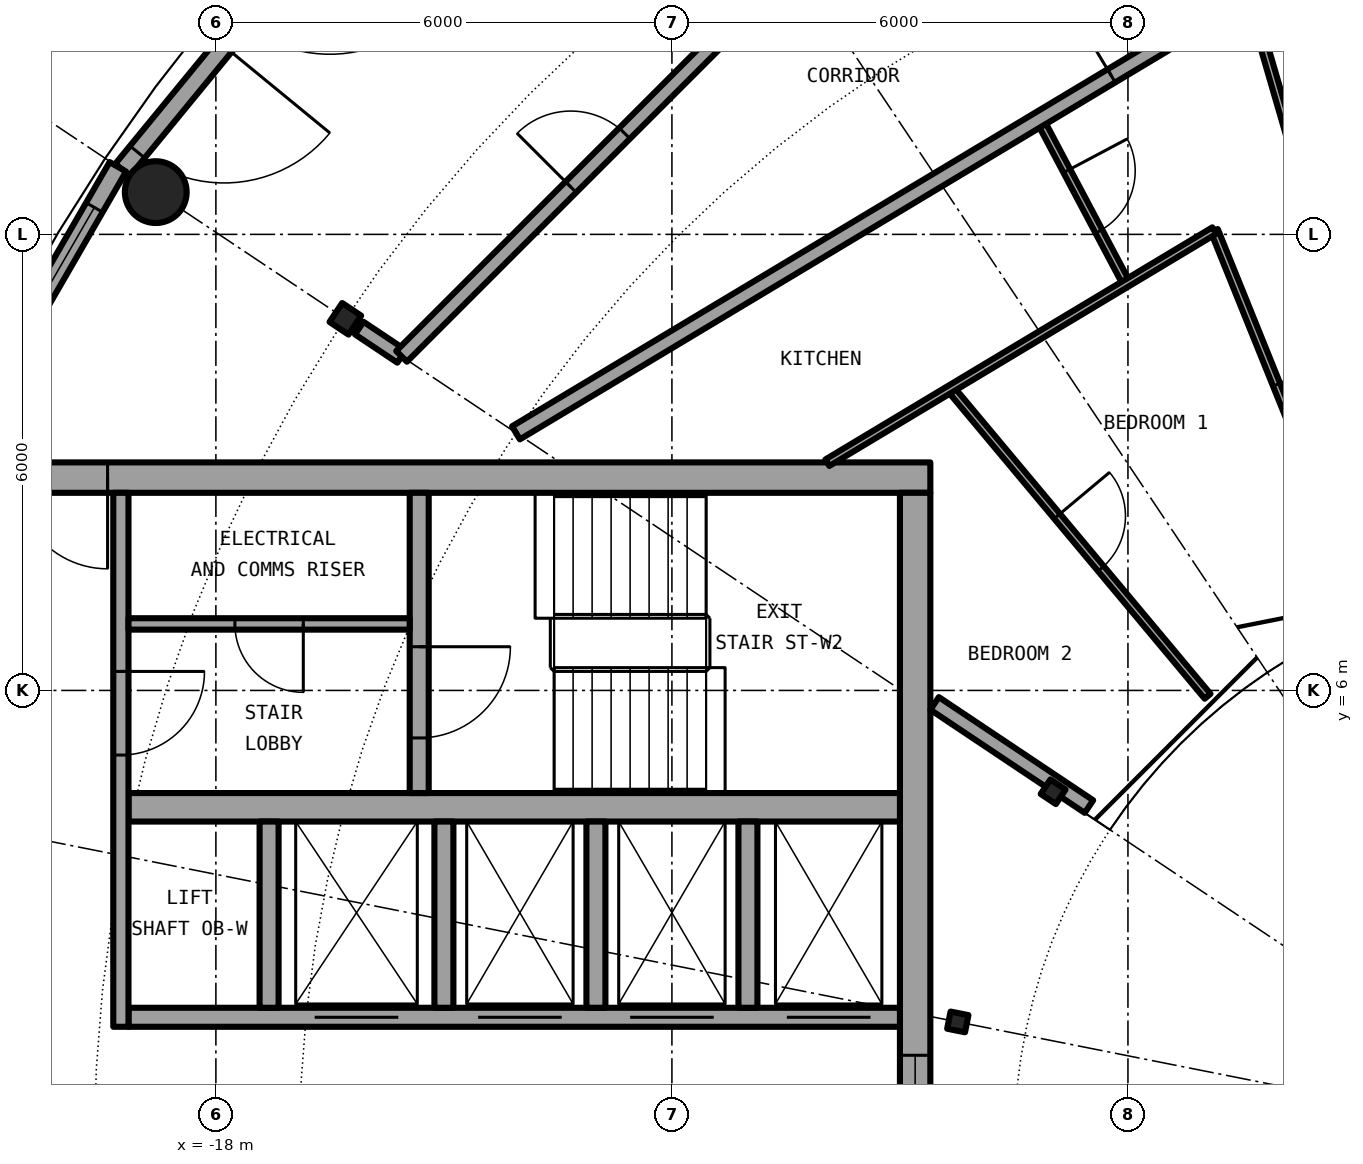
"""IFC4 building model, lengths in metres.
Left out: names, types, materials, properties, quantities, classifications, styles, units other than length and angle.
Written with IfcOpenShell. Run it as: python <this file> out.ifc"""

import sys

from ifc_helpers import new_model, si_unit, direction, frame, frame_2d, origin, origin_2d, place, context, subcontext, project, spatial, rectangle, hollow_circle, i_section, extrude, element, fill, save


model = new_model("IFC4")
c1 = context("Model", 3, precision=1e-05, world=origin(), true_north=direction((0.0, 1.0)))
c2 = subcontext(c1, "Body", "Model", "MODEL_VIEW")
j1 = project(units=[si_unit("LENGTHUNIT", "METRE"), si_unit("PLANEANGLEUNIT", "RADIAN")], contexts=[c1])
p1 = place(None, origin())
s1 = spatial("IfcSite", under=j1, at=p1, CompositionType="ELEMENT")
p2 = place(p1, origin())
s2 = spatial("IfcBuilding", under=s1, at=p2, CompositionType="ELEMENT")
p3 = place(p2, frame((0.0, 0.0, 249.3)))
s3 = spatial("IfcBuildingStorey", under=s2, at=p3, CompositionType="ELEMENT", Elevation=249.3)
p4 = place(p3, frame((-18.791, 12.556, 0.0), z_axis=(0.0, 0.0, 1.0), x_axis=(1.0, 0.0, 0.0)))
e1 = element("IfcColumn", 1, at=p4, inside=s3, PredefinedType="COLUMN", context=c2, shape_type="SweptSolid", body=[
    extrude(hollow_circle(Radius=0.406, WallThickness=0.03, at=origin_2d()), origin(), (0.0, 0.0, 1.0), 3.05),
])
p5 = place(p3, frame((-16.297, 10.889, 0.0), z_axis=(0.0, 0.0, 1.0), x_axis=(-0.831469612303, 0.55557023302, 0.0)))
e2 = element("IfcColumn", 2, at=p5, inside=s3, PredefinedType="COLUMN", context=c2, shape_type="SweptSolid", body=[
    extrude(i_section(OverallWidth=0.3, OverallDepth=0.3, WebThickness=0.011, FlangeThickness=0.019, FilletRadius=0.027, at=origin_2d()), origin(), (0.0, 0.0, 1.0), 3.05),
])
for number, where, z_axis, x_axis in (
    (3, (-6.984, 4.667, 0.0), (0.0, 0.0, 1.0), (-0.831, 0.556, 0.0)),
    (4, (-8.239, 1.639, 0.0), (0.0, 0.0, 1.0), (-0.981, 0.195, 0.0)),
):
    element("IfcColumn", number, at=place(p3, frame(where, z_axis=z_axis, x_axis=x_axis)), inside=s3, PredefinedType="COLUMN", context=c2, shape_type="SweptSolid", body=[
        extrude(i_section(OverallWidth=0.24, OverallDepth=0.23, WebThickness=0.008, FlangeThickness=0.012, FilletRadius=0.021, at=origin_2d()), origin(), (0.0, 0.0, 1.0), 3.05),
    ])
p6 = place(p3, frame((-16.352, 16.352, 0.0), z_axis=(0.0, 0.0, 1.0), x_axis=(-0.634418942337, -0.772989395532, 0.0)))
e5 = element("IfcWall", 5, at=p6, inside=s3, PredefinedType="SOLIDWALL", context=c2, shape_type="SweptSolid", body=[
    extrude(rectangle(XDim=4.533, YDim=0.25, at=frame_2d((2.267, 0.0))), origin(), (0.0, 0.0, 1.0), 2.7),
])
p7 = place(p6, frame((0.236, 0.0, 0.0)))
e6 = element("IfcOpeningElement", 6, at=p7, cuts=e5, PredefinedType="OPENING", context=c2, shape_type="SweptSolid", body=[
    extrude(rectangle(XDim=1.8, YDim=2.2, at=frame_2d((0.9, 1.1))), frame((0.0, 0.135, 0.0), z_axis=(0.0, -1.0, 0.0), x_axis=(1.0, 0.0, 0.0)), (0.0, 0.0, 1.0), 0.27),
])
p8 = place(p6, frame((2.427, 0.0, 0.0)))
e7 = element("IfcOpeningElement", 7, at=p8, cuts=e5, PredefinedType="OPENING", context=c2, shape_type="SweptSolid", body=[
    extrude(rectangle(XDim=1.8, YDim=2.2, at=frame_2d((0.9, 1.1))), frame((0.0, 0.135, 0.0), z_axis=(0.0, -1.0, 0.0), x_axis=(1.0, 0.0, 0.0)), (0.0, 0.0, 1.0), 0.27),
])
p9 = place(p3, frame((-19.29, 12.889, 0.0), z_axis=(0.0, 0.0, 1.0), x_axis=(-0.499903546559, -0.866081084043, 0.0)))
e8 = element("IfcWall", 8, at=p9, inside=s3, PredefinedType="SOLIDWALL", context=c2, shape_type="SweptSolid", body=[
    extrude(rectangle(XDim=3.034, YDim=0.25, at=frame_2d((1.517, 0.0))), origin(), (0.0, 0.0, 1.0), 2.7),
])
p10 = place(p9, frame((0.617, 0.0, 0.3)))
e9 = element("IfcOpeningElement", 9, at=p10, cuts=e8, PredefinedType="OPENING", context=c2, shape_type="SweptSolid", body=[
    extrude(rectangle(XDim=1.8, YDim=2.1, at=frame_2d((0.9, 1.05))), frame((0.0, 0.135, 0.0), z_axis=(0.0, -1.0, 0.0), x_axis=(1.0, 0.0, 0.0)), (0.0, 0.0, 1.0), 0.27),
])
p11 = place(p3, frame((-8.6, 8.8, 0.0), z_axis=(0.0, 0.0, 1.0), x_axis=(-1.0, 0.0, 0.0)))
e10 = element("IfcWall", 10, at=p11, inside=s3, PredefinedType="SHEAR", context=c2, shape_type="SweptSolid", body=[
    extrude(rectangle(XDim=12.5, YDim=0.4, at=frame_2d((6.25, 0.0))), origin(), (0.0, 0.0, 1.0), 3.05),
])
p12 = place(p11, frame((10.825, 0.0, 0.0)))
e11 = element("IfcOpeningElement", 11, at=p12, cuts=e10, PredefinedType="OPENING", context=c2, shape_type="SweptSolid", body=[
    extrude(rectangle(XDim=1.2, YDim=2.3, at=frame_2d((0.6, 1.15))), frame((0.0, 0.21, 0.0), z_axis=(0.0, -1.0, 0.0), x_axis=(1.0, 0.0, 0.0)), (0.0, 0.0, 1.0), 0.42),
])
p13 = place(p3, frame((-8.8, 8.6, 0.0), z_axis=(0.0, 0.0, 1.0), x_axis=(0.0, -1.0, 0.0)))
e12 = element("IfcWall", 12, at=p13, inside=s3, PredefinedType="SHEAR", context=c2, shape_type="SweptSolid", body=[
    extrude(rectangle(XDim=17.2, YDim=0.4, at=frame_2d((8.6, 0.0))), origin(), (0.0, 0.0, 1.0), 3.05),
])
p14 = place(p13, frame((7.4, 0.0, 0.1)))
e13 = element("IfcOpeningElement", 13, at=p14, cuts=e12, PredefinedType="OPENING", context=c2, shape_type="SweptSolid", body=[
    extrude(rectangle(XDim=2.4, YDim=2.2, at=frame_2d((1.2, 1.1))), frame((0.0, 0.21, 0.0), z_axis=(0.0, -1.0, 0.0), x_axis=(1.0, 0.0, 0.0)), (0.0, 0.0, 1.0), 0.42),
])
p15 = place(p3, frame((-9.0, 1.7, 0.0), z_axis=(0.0, 0.0, 1.0), x_axis=(-1.0, 0.0, 0.0)))
e14 = element("IfcWall", 14, at=p15, inside=s3, PredefinedType="SHEAR", context=c2, shape_type="SweptSolid", body=[
    extrude(rectangle(XDim=10.15, YDim=0.25, at=frame_2d((5.075, 0.0))), origin(), (0.0, 0.0, 1.0), 3.05),
])
p16 = place(p15, frame((0.387, 0.0, 0.0)))
e15 = element("IfcOpeningElement", 15, at=p16, cuts=e14, PredefinedType="OPENING", context=c2, shape_type="SweptSolid", body=[
    extrude(rectangle(XDim=1.1, YDim=2.3, at=frame_2d((0.55, 1.15))), frame((0.0, 0.135, 0.0), z_axis=(0.0, -1.0, 0.0), x_axis=(1.0, 0.0, 0.0)), (0.0, 0.0, 1.0), 0.27),
])
p17 = place(p15, frame((2.45, 0.0, 0.0)))
e16 = element("IfcOpeningElement", 16, at=p17, cuts=e14, PredefinedType="OPENING", context=c2, shape_type="SweptSolid", body=[
    extrude(rectangle(XDim=1.1, YDim=2.3, at=frame_2d((0.55, 1.15))), frame((0.0, 0.135, 0.0), z_axis=(0.0, -1.0, 0.0), x_axis=(1.0, 0.0, 0.0)), (0.0, 0.0, 1.0), 0.27),
])
p18 = place(p15, frame((4.45, 0.0, 0.0)))
e17 = element("IfcOpeningElement", 17, at=p18, cuts=e14, PredefinedType="OPENING", context=c2, shape_type="SweptSolid", body=[
    extrude(rectangle(XDim=1.1, YDim=2.3, at=frame_2d((0.55, 1.15))), frame((0.0, 0.135, 0.0), z_axis=(0.0, -1.0, 0.0), x_axis=(1.0, 0.0, 0.0)), (0.0, 0.0, 1.0), 0.27),
])
p19 = place(p15, frame((6.6, 0.0, 0.0)))
e18 = element("IfcOpeningElement", 18, at=p19, cuts=e14, PredefinedType="OPENING", context=c2, shape_type="SweptSolid", body=[
    extrude(rectangle(XDim=1.1, YDim=2.3, at=frame_2d((0.55, 1.15))), frame((0.0, 0.135, 0.0), z_axis=(0.0, -1.0, 0.0), x_axis=(1.0, 0.0, 0.0)), (0.0, 0.0, 1.0), 0.27),
])
p20 = place(p3, frame((-9.0, 4.462, 0.0), z_axis=(0.0, 0.0, 1.0), x_axis=(-1.0, 0.0, 0.0)))
e19 = element("IfcWall", 19, at=p20, inside=s3, PredefinedType="SHEAR", context=c2, shape_type="SweptSolid", body=[
    extrude(rectangle(XDim=10.15, YDim=0.375, at=frame_2d((5.075, 0.0))), origin(), (0.0, 0.0, 1.0), 3.05),
])
p21 = place(p3, frame((-15.325, 8.6, 0.0), z_axis=(0.0, 0.0, 1.0), x_axis=(0.0, -1.0, 0.0)))
e20 = element("IfcWall", 20, at=p21, inside=s3, PredefinedType="SHEAR", context=c2, shape_type="SweptSolid", body=[
    extrude(rectangle(XDim=3.95, YDim=0.25, at=frame_2d((1.975, 0.0))), origin(), (0.0, 0.0, 1.0), 3.05),
])
p22 = place(p21, frame((2.025, 0.0, 0.0)))
e21 = element("IfcOpeningElement", 21, at=p22, cuts=e20, PredefinedType="OPENING", context=c2, shape_type="SweptSolid", body=[
    extrude(rectangle(XDim=1.2, YDim=2.3, at=frame_2d((0.6, 1.15))), frame((0.0, 0.135, 0.0), z_axis=(0.0, -1.0, 0.0), x_axis=(1.0, 0.0, 0.0)), (0.0, 0.0, 1.0), 0.27),
])
for number, where, z_axis, x_axis in (
    (22, (-15.0, 1.825, 0.0), (0.0, 0.0, 1.0), (0.0, 1.0, 0.0)),
    (23, (-17.3, 1.825, 0.0), (0.0, 0.0, 1.0), (0.0, 1.0, 0.0)),
):
    element("IfcWall", number, at=place(p3, frame(where, z_axis=z_axis, x_axis=x_axis)), inside=s3, PredefinedType="SOLIDWALL", context=c2, shape_type="SweptSolid", body=[
        extrude(rectangle(XDim=2.45, YDim=0.25, at=frame_2d((1.225, 0.0))), origin(), (0.0, 0.0, 1.0), 2.7),
    ])
p23 = place(p3, frame((-19.25, 8.6, 0.0), z_axis=(0.0, 0.0, 1.0), x_axis=(0.0, -1.0, 0.0)))
e24 = element("IfcWall", 24, at=p23, inside=s3, PredefinedType="SOLIDWALL", context=c2, shape_type="SweptSolid", body=[
    extrude(rectangle(XDim=7.025, YDim=0.2, at=frame_2d((3.513, 0.0))), origin(), (0.0, 0.0, 1.0), 2.7),
])
p24 = place(p23, frame((2.35, 0.0, 0.0)))
e25 = element("IfcOpeningElement", 25, at=p24, cuts=e24, PredefinedType="OPENING", context=c2, shape_type="SweptSolid", body=[
    extrude(rectangle(XDim=1.1, YDim=2.3, at=frame_2d((0.55, 1.15))), frame((0.0, 0.11, 0.0), z_axis=(0.0, -1.0, 0.0), x_axis=(1.0, 0.0, 0.0)), (0.0, 0.0, 1.0), 0.22),
])
for number, where, z_axis, x_axis in (
    (26, (-11.0, 1.825, 0.0), (0.0, 0.0, 1.0), (0.0, 1.0, 0.0)),
    (27, (-13.0, 1.825, 0.0), (0.0, 0.0, 1.0), (0.0, 1.0, 0.0)),
):
    element("IfcWall", number, at=place(p3, frame(where, z_axis=z_axis, x_axis=x_axis)), inside=s3, PredefinedType="SOLIDWALL", context=c2, shape_type="SweptSolid", body=[
        extrude(rectangle(XDim=2.45, YDim=0.25, at=frame_2d((1.225, 0.0))), origin(), (0.0, 0.0, 1.0), 2.7),
    ])
p25 = place(p3, frame((-15.45, 6.875, 0.0), z_axis=(0.0, 0.0, 1.0), x_axis=(-1.0, 0.0, 0.0)))
e28 = element("IfcWall", 28, at=p25, inside=s3, PredefinedType="PARTITIONING", context=c2, shape_type="SweptSolid", body=[
    extrude(rectangle(XDim=3.7, YDim=0.15, at=frame_2d((1.85, 0.0))), origin(), (0.0, 0.0, 1.0), 2.7),
])
p26 = place(p25, frame((1.4, 0.0, 0.0)))
e29 = element("IfcOpeningElement", 29, at=p26, cuts=e28, PredefinedType="OPENING", context=c2, shape_type="SweptSolid", body=[
    extrude(rectangle(XDim=0.9, YDim=2.3, at=frame_2d((0.45, 1.15))), frame((0.0, 0.085, 0.0), z_axis=(0.0, -1.0, 0.0), x_axis=(1.0, 0.0, 0.0)), (0.0, 0.0, 1.0), 0.17),
])
p27 = place(p3, frame((-16.114, 10.767, 0.0), z_axis=(0.0, 0.0, 1.0), x_axis=(0.831601508083, -0.555372786292, 0.0)))
e30 = element("IfcWall", 30, at=p27, inside=s3, PredefinedType="PARTITIONING", context=c2, shape_type="SweptSolid", body=[
    extrude(rectangle(XDim=0.67, YDim=0.2, at=frame_2d((0.335, 0.0))), origin(), (0.0, 0.0, 1.0), 2.7),
])
p28 = place(p3, frame((-8.335, 9.97, 0.0), z_axis=(0.0, 0.0, 1.0), x_axis=(0.641376424834, -0.767226356213, 0.0)))
e31 = element("IfcWall", 31, at=p28, inside=s3, PredefinedType="PARTITIONING", context=c2, shape_type="SweptSolid", body=[
    extrude(rectangle(XDim=5.275, YDim=0.1, at=frame_2d((2.637, 0.0))), origin(), (0.0, 0.0, 1.0), 2.7),
])
p29 = place(p28, frame((2.187, 0.0, 0.0)))
e32 = element("IfcOpeningElement", 32, at=p29, cuts=e31, PredefinedType="OPENING", context=c2, shape_type="SweptSolid", body=[
    extrude(rectangle(XDim=0.9, YDim=2.3, at=frame_2d((0.45, 1.15))), frame((0.0, 0.06, 0.0), z_axis=(0.0, -1.0, 0.0), x_axis=(1.0, 0.0, 0.0)), (0.0, 0.0, 1.0), 0.12),
])
p30 = place(p3, frame((-7.166, 13.517, 0.0), z_axis=(0.0, 0.0, 1.0), x_axis=(0.468337293896, -0.883549760425, 0.0)))
e33 = element("IfcWall", 33, at=p30, inside=s3, PredefinedType="PARTITIONING", context=c2, shape_type="SweptSolid", body=[
    extrude(rectangle(XDim=2.445, YDim=0.1, at=frame_2d((1.222, 0.0))), origin(), (0.0, 0.0, 1.0), 2.7),
])
p31 = place(p30, frame((0.772, 0.0, 0.0)))
e34 = element("IfcOpeningElement", 34, at=p31, cuts=e33, PredefinedType="OPENING", context=c2, shape_type="SweptSolid", body=[
    extrude(rectangle(XDim=0.9, YDim=2.3, at=frame_2d((0.45, 1.15))), frame((0.0, 0.06, 0.0), z_axis=(0.0, -1.0, 0.0), x_axis=(1.0, 0.0, 0.0)), (0.0, 0.0, 1.0), 0.12),
])
p32 = place(p3, frame((-4.864, 12.051, 0.0), z_axis=(0.0, 0.0, 1.0), x_axis=(0.374372761824, -0.927278294367, 0.0)))
e35 = element("IfcWall", 35, at=p32, inside=s3, PredefinedType="PARTITIONING", context=c2, shape_type="SweptSolid", body=[
    extrude(rectangle(XDim=5.276, YDim=0.1, at=frame_2d((2.638, 0.0))), origin(), (0.0, 0.0, 1.0), 2.7),
])
p33 = place(p32, frame((2.188, 0.0, 0.0)))
e36 = element("IfcOpeningElement", 36, at=p33, cuts=e35, PredefinedType="OPENING", context=c2, shape_type="SweptSolid", body=[
    extrude(rectangle(XDim=0.9, YDim=2.3, at=frame_2d((0.45, 1.15))), frame((0.0, 0.06, 0.0), z_axis=(0.0, -1.0, 0.0), x_axis=(1.0, 0.0, 0.0)), (0.0, 0.0, 1.0), 0.12),
])
p34 = place(p3, frame((-4.411, 15.168, 0.0), z_axis=(0.0, 0.0, 1.0), x_axis=(0.279201466266, -0.960232545395, 0.0)))
e37 = element("IfcWall", 37, at=p34, inside=s3, PredefinedType="PARTITIONING", context=c2, shape_type="SweptSolid", body=[
    extrude(rectangle(XDim=2.524, YDim=0.1, at=frame_2d((1.262, 0.0))), origin(), (0.0, 0.0, 1.0), 2.7),
])
p35 = place(p3, frame((-6.513, 4.472, 0.0), z_axis=(0.0, 0.0, 1.0), x_axis=(-0.831450132577, 0.555599385382, 0.0)))
e38 = element("IfcWall", 38, at=p35, inside=s3, PredefinedType="PARTITIONING", context=c2, shape_type="SweptSolid", body=[
    extrude(rectangle(XDim=2.443, YDim=0.2, at=frame_2d((1.221, 0.0))), origin(), (0.0, 0.0, 1.0), 2.7),
])
p36 = place(p3, frame((-9.955, 8.996, 0.0), z_axis=(0.0, 0.0, 1.0), x_axis=(0.857587239633, 0.514338532894, 0.0)))
e39 = element("IfcWall", 39, at=p36, inside=s3, PredefinedType="PARTITIONING", context=c2, shape_type="SweptSolid", body=[
    extrude(rectangle(XDim=5.938, YDim=0.1, at=frame_2d((2.969, 0.0))), origin(), (0.0, 0.0, 1.0), 2.7),
])
p37 = place(p3, frame((-14.052, 9.389, 0.0), z_axis=(0.0, 0.0, 1.0), x_axis=(0.857683679102, 0.51417769944, 0.0)))
e40 = element("IfcWall", 40, at=p37, inside=s3, PredefinedType="PARTITIONING", context=c2, shape_type="SweptSolid", body=[
    extrude(rectangle(XDim=14.451, YDim=0.2, at=frame_2d((7.225, 0.0))), origin(), (0.0, 0.0, 1.0), 2.7),
])
p38 = place(p37, frame((9.134, 0.0, 0.0)))
e41 = element("IfcOpeningElement", 41, at=p38, cuts=e40, PredefinedType="OPENING", context=c2, shape_type="SweptSolid", body=[
    extrude(rectangle(XDim=1.0, YDim=2.3, at=frame_2d((0.5, 1.15))), frame((0.0, 0.11, 0.0), z_axis=(0.0, -1.0, 0.0), x_axis=(1.0, 0.0, 0.0)), (0.0, 0.0, 1.0), 0.22),
])
p39 = place(p3, frame((-15.557, 10.395, 0.0), z_axis=(0.0, 0.0, 1.0), x_axis=(0.707106781187, 0.707106781187, 0.0)))
e42 = element("IfcWall", 42, at=p39, inside=s3, PredefinedType="PARTITIONING", context=c2, shape_type="SweptSolid", body=[
    extrude(rectangle(XDim=7.3, YDim=0.2, at=frame_2d((3.65, 0.0))), origin(), (0.0, 0.0, 1.0), 2.7),
])
p40 = place(p39, frame((3.15, 0.0, 0.0)))
e43 = element("IfcOpeningElement", 43, at=p40, cuts=e42, PredefinedType="OPENING", context=c2, shape_type="SweptSolid", body=[
    extrude(rectangle(XDim=1.0, YDim=2.3, at=frame_2d((0.5, 1.15))), frame((0.0, 0.11, 0.0), z_axis=(0.0, -1.0, 0.0), x_axis=(1.0, 0.0, 0.0)), (0.0, 0.0, 1.0), 0.22),
])
p41 = place(p8, origin())
e44 = element("IfcDoor", 44, at=p41, inside=s3, OperationType="SINGLE_SWING_LEFT", PredefinedType="DOOR", context=c2, shape_type="SweptSolid", body=[
    extrude(rectangle(XDim=1.8, YDim=2.2, at=frame_2d((0.9, 1.1))), frame((0.0, 0.025, 0.0), z_axis=(0.0, -1.0, 0.0), x_axis=(1.0, 0.0, 0.0)), (0.0, 0.0, 1.0), 0.05),
])
fill(e7, e44)
p42 = place(p10, origin())
e45 = element("IfcWindow", 45, at=p42, inside=s3, PartitioningType="SINGLE_PANEL", PredefinedType="WINDOW", context=c2, shape_type="SweptSolid", body=[
    extrude(rectangle(XDim=1.8, YDim=2.1, at=frame_2d((0.9, 1.05))), frame((0.0, 0.03, 0.0), z_axis=(0.0, -1.0, 0.0), x_axis=(1.0, 0.0, 0.0)), (0.0, 0.0, 1.0), 0.06),
])
fill(e9, e45)
p43 = place(p16, origin())
e46 = element("IfcDoor", 46, at=p43, inside=s3, OperationType="DOUBLE_DOOR_SLIDING", PredefinedType="DOOR", context=c2, shape_type="SweptSolid", body=[
    extrude(rectangle(XDim=1.1, YDim=2.3, at=frame_2d((0.55, 1.15))), frame((0.0, 0.025, 0.0), z_axis=(0.0, -1.0, 0.0), x_axis=(1.0, 0.0, 0.0)), (0.0, 0.0, 1.0), 0.05),
])
fill(e15, e46)
p44 = place(p17, origin())
e47 = element("IfcDoor", 47, at=p44, inside=s3, OperationType="DOUBLE_DOOR_SLIDING", PredefinedType="DOOR", context=c2, shape_type="SweptSolid", body=[
    extrude(rectangle(XDim=1.1, YDim=2.3, at=frame_2d((0.55, 1.15))), frame((0.0, 0.025, 0.0), z_axis=(0.0, -1.0, 0.0), x_axis=(1.0, 0.0, 0.0)), (0.0, 0.0, 1.0), 0.05),
])
fill(e16, e47)
p45 = place(p18, origin())
e48 = element("IfcDoor", 48, at=p45, inside=s3, OperationType="DOUBLE_DOOR_SLIDING", PredefinedType="DOOR", context=c2, shape_type="SweptSolid", body=[
    extrude(rectangle(XDim=1.1, YDim=2.3, at=frame_2d((0.55, 1.15))), frame((0.0, 0.025, 0.0), z_axis=(0.0, -1.0, 0.0), x_axis=(1.0, 0.0, 0.0)), (0.0, 0.0, 1.0), 0.05),
])
fill(e17, e48)
p46 = place(p19, origin())
e49 = element("IfcDoor", 49, at=p46, inside=s3, OperationType="DOUBLE_DOOR_SLIDING", PredefinedType="DOOR", context=c2, shape_type="SweptSolid", body=[
    extrude(rectangle(XDim=1.1, YDim=2.3, at=frame_2d((0.55, 1.15))), frame((0.0, 0.025, 0.0), z_axis=(0.0, -1.0, 0.0), x_axis=(1.0, 0.0, 0.0)), (0.0, 0.0, 1.0), 0.05),
])
fill(e18, e49)
p47 = place(p26, origin())
e50 = element("IfcDoor", 50, at=p47, inside=s3, OperationType="SINGLE_SWING_LEFT", PredefinedType="DOOR", context=c2, shape_type="SweptSolid", body=[
    extrude(rectangle(XDim=0.9, YDim=2.3, at=frame_2d((0.45, 1.15))), frame((0.0, 0.025, 0.0), z_axis=(0.0, -1.0, 0.0), x_axis=(1.0, 0.0, 0.0)), (0.0, 0.0, 1.0), 0.05),
])
fill(e29, e50)
p48 = place(p22, origin())
e51 = element("IfcDoor", 51, at=p48, inside=s3, OperationType="SINGLE_SWING_LEFT", PredefinedType="DOOR", context=c2, shape_type="SweptSolid", body=[
    extrude(rectangle(XDim=1.2, YDim=2.3, at=frame_2d((0.6, 1.15))), frame((0.0, 0.025, 0.0), z_axis=(0.0, -1.0, 0.0), x_axis=(1.0, 0.0, 0.0)), (0.0, 0.0, 1.0), 0.05),
])
fill(e21, e51)
p49 = place(p24, origin())
e52 = element("IfcDoor", 52, at=p49, inside=s3, OperationType="SINGLE_SWING_RIGHT", PredefinedType="DOOR", context=c2, shape_type="SweptSolid", body=[
    extrude(rectangle(XDim=1.1, YDim=2.3, at=frame_2d((0.55, 1.15))), frame((0.0, 0.025, 0.0), z_axis=(0.0, -1.0, 0.0), x_axis=(1.0, 0.0, 0.0)), (0.0, 0.0, 1.0), 0.05),
])
fill(e25, e52)
p50 = place(p12, origin())
e53 = element("IfcDoor", 53, at=p50, inside=s3, OperationType="SINGLE_SWING_LEFT", PredefinedType="DOOR", context=c2, shape_type="SweptSolid", body=[
    extrude(rectangle(XDim=1.2, YDim=2.3, at=frame_2d((0.6, 1.15))), frame((0.0, 0.025, 0.0), z_axis=(0.0, -1.0, 0.0), x_axis=(1.0, 0.0, 0.0)), (0.0, 0.0, 1.0), 0.05),
])
fill(e11, e53)
p51 = place(p14, origin())
e54 = element("IfcWindow", 54, at=p51, inside=s3, PartitioningType="SINGLE_PANEL", PredefinedType="WINDOW", context=c2, shape_type="SweptSolid", body=[
    extrude(rectangle(XDim=2.4, YDim=2.2, at=frame_2d((1.2, 1.1))), frame((0.0, 0.03, 0.0), z_axis=(0.0, -1.0, 0.0), x_axis=(1.0, 0.0, 0.0)), (0.0, 0.0, 1.0), 0.06),
])
fill(e13, e54)
p52 = place(p40, origin())
e55 = element("IfcDoor", 55, at=p52, inside=s3, OperationType="SINGLE_SWING_LEFT", PredefinedType="DOOR", context=c2, shape_type="SweptSolid", body=[
    extrude(rectangle(XDim=1.0, YDim=2.3, at=frame_2d((0.5, 1.15))), frame((0.0, 0.025, 0.0), z_axis=(0.0, -1.0, 0.0), x_axis=(1.0, 0.0, 0.0)), (0.0, 0.0, 1.0), 0.05),
])
fill(e43, e55)
p53 = place(p38, origin())
e56 = element("IfcDoor", 56, at=p53, inside=s3, OperationType="SINGLE_SWING_RIGHT", PredefinedType="DOOR", context=c2, shape_type="SweptSolid", body=[
    extrude(rectangle(XDim=1.0, YDim=2.3, at=frame_2d((0.5, 1.15))), frame((0.0, 0.025, 0.0), z_axis=(0.0, -1.0, 0.0), x_axis=(1.0, 0.0, 0.0)), (0.0, 0.0, 1.0), 0.05),
])
fill(e41, e56)
p54 = place(p31, origin())
e57 = element("IfcDoor", 57, at=p54, inside=s3, OperationType="SINGLE_SWING_LEFT", PredefinedType="DOOR", context=c2, shape_type="SweptSolid", body=[
    extrude(rectangle(XDim=0.9, YDim=2.3, at=frame_2d((0.45, 1.15))), frame((0.0, 0.025, 0.0), z_axis=(0.0, -1.0, 0.0), x_axis=(1.0, 0.0, 0.0)), (0.0, 0.0, 1.0), 0.05),
])
fill(e34, e57)
p55 = place(p33, origin())
e58 = element("IfcDoor", 58, at=p55, inside=s3, OperationType="SINGLE_SWING_RIGHT", PredefinedType="DOOR", context=c2, shape_type="SweptSolid", body=[
    extrude(rectangle(XDim=0.9, YDim=2.3, at=frame_2d((0.45, 1.15))), frame((0.0, 0.025, 0.0), z_axis=(0.0, -1.0, 0.0), x_axis=(1.0, 0.0, 0.0)), (0.0, 0.0, 1.0), 0.05),
])
fill(e36, e58)
p56 = place(p29, origin())
e59 = element("IfcDoor", 59, at=p56, inside=s3, OperationType="SINGLE_SWING_RIGHT", PredefinedType="DOOR", context=c2, shape_type="SweptSolid", body=[
    extrude(rectangle(XDim=0.9, YDim=2.3, at=frame_2d((0.45, 1.15))), frame((0.0, 0.025, 0.0), z_axis=(0.0, -1.0, 0.0), x_axis=(1.0, 0.0, 0.0)), (0.0, 0.0, 1.0), 0.05),
])
fill(e32, e59)
save(model, sys.argv[1])
